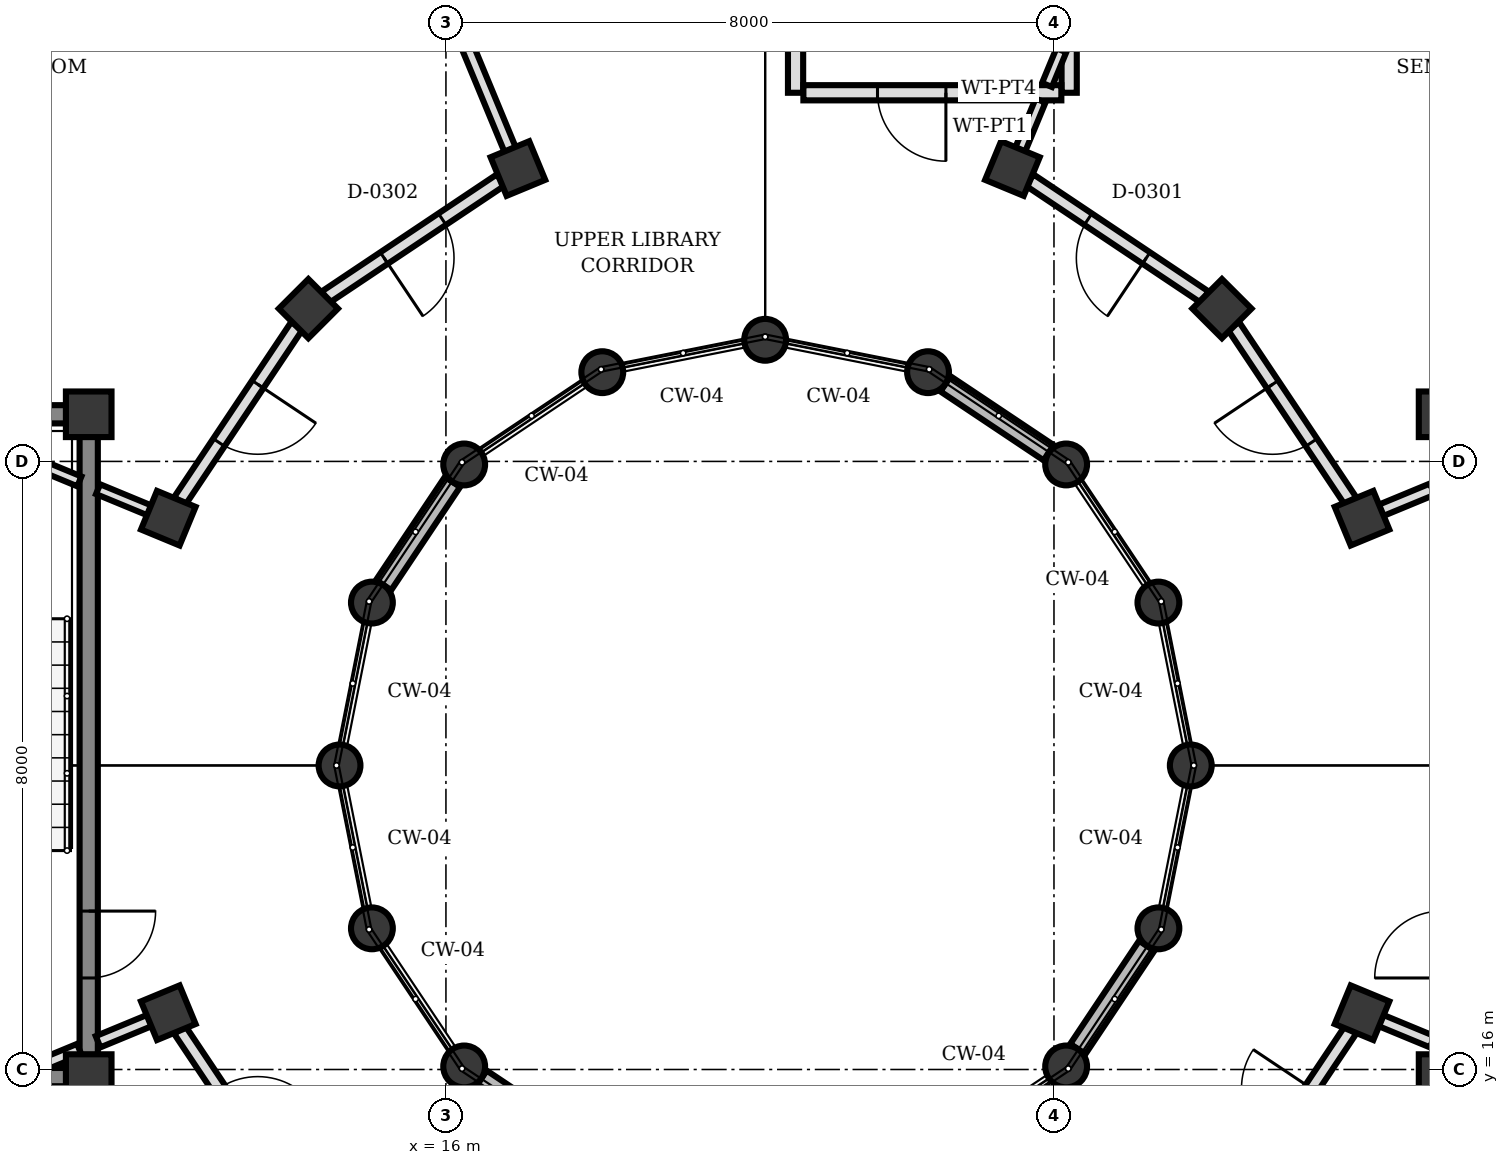
"""IFC4 building model, lengths in metres.
Left out: names, types, materials, properties, quantities, classifications, styles, units other than length and angle.
Written with IfcOpenShell. Run it as: python <this file> out.ifc"""

import sys

from ifc_helpers import new_model, si_unit, direction, frame, frame_2d, origin, origin_2d, place, context, subcontext, project, spatial, rectangle, circle, extrude, element, fill, save


model = new_model("IFC4")
c1 = context("Model", 3, precision=1e-05, world=origin(), true_north=direction((0.0, 1.0)))
c2 = subcontext(c1, "Body", "Model", "MODEL_VIEW")
j1 = project(units=[si_unit("LENGTHUNIT", "METRE"), si_unit("PLANEANGLEUNIT", "RADIAN")], contexts=[c1])
p1 = place(None, origin())
s1 = spatial("IfcSite", under=j1, at=p1, CompositionType="ELEMENT")
p2 = place(p1, origin())
s2 = spatial("IfcBuilding", under=s1, at=p2, CompositionType="ELEMENT")
p3 = place(p2, frame((0.0, 0.0, 8.5)))
s3 = spatial("IfcBuildingStorey", under=s2, at=p3, CompositionType="ELEMENT", Elevation=8.5)
for number, where, z_axis, x_axis in (
    (1, (11.3, 15.9, 0.0), (0.0, 0.0, 1.0), (1.0, 0.0, 0.0)),
    (2, (11.3, 24.62, 0.0), (0.0, 0.0, 1.0), (1.0, 0.0, 0.0)),
    (3, (29.1, 15.9, 0.0), (0.0, 0.0, 1.0), (1.0, 0.0, 0.0)),
    (4, (29.1, 24.62, 0.0), (0.0, 0.0, 1.0), (1.0, 0.0, 0.0)),
):
    element("IfcColumn", number, at=place(p3, frame(where, z_axis=z_axis, x_axis=x_axis)), inside=s3, PredefinedType="COLUMN", context=c2, shape_type="SweptSolid", body=[
        extrude(rectangle(XDim=0.6, YDim=0.6, at=origin_2d()), origin(), (0.0, 0.0, 1.0), 4.0),
    ])
for number, where, z_axis, x_axis in (
    (5, (25.8, 20.0, 0.0), (0.0, 0.0, 1.0), (1.0, 0.0, 0.0)),
    (6, (25.374, 22.143, 0.0), (0.0, 0.0, 1.0), (1.0, 0.0, 0.0)),
    (7, (24.16, 23.96, 0.0), (0.0, 0.0, 1.0), (1.0, 0.0, 0.0)),
    (8, (22.343, 25.174, 0.0), (0.0, 0.0, 1.0), (1.0, 0.0, 0.0)),
    (9, (20.2, 25.6, 0.0), (0.0, 0.0, 1.0), (1.0, 0.0, 0.0)),
    (10, (18.057, 25.174, 0.0), (0.0, 0.0, 1.0), (1.0, 0.0, 0.0)),
    (11, (16.24, 23.96, 0.0), (0.0, 0.0, 1.0), (1.0, 0.0, 0.0)),
    (12, (15.026, 22.143, 0.0), (0.0, 0.0, 1.0), (1.0, 0.0, 0.0)),
    (13, (14.6, 20.0, 0.0), (0.0, 0.0, 1.0), (1.0, 0.0, 0.0)),
    (14, (15.026, 17.857, 0.0), (0.0, 0.0, 1.0), (1.0, 0.0, 0.0)),
    (15, (16.24, 16.04, 0.0), (0.0, 0.0, 1.0), (1.0, 0.0, 0.0)),
    (16, (24.16, 16.04, 0.0), (0.0, 0.0, 1.0), (1.0, 0.0, 0.0)),
    (17, (25.374, 17.857, 0.0), (0.0, 0.0, 1.0), (1.0, 0.0, 0.0)),
):
    element("IfcColumn", number, at=place(p3, frame(where, z_axis=z_axis, x_axis=x_axis)), inside=s3, PredefinedType="COLUMN", context=c2, shape_type="SweptSolid", body=[
        extrude(circle(Radius=0.275, at=origin_2d()), origin(), (0.0, 0.0, 1.0), 4.0),
    ])
for number, where, z_axis, x_axis in (
    (18, (28.053, 23.253, 0.0), (0.0, 0.0, 1.0), (0.924, 0.383, 0.0)),
    (19, (26.21, 26.01, 0.0), (0.0, 0.0, 1.0), (0.707, 0.707, 0.0)),
    (20, (23.453, 27.853, 0.0), (0.0, 0.0, 1.0), (0.383, 0.924, 0.0)),
    (21, (16.947, 27.853, 0.0), (0.0, 0.0, 1.0), (-0.383, 0.924, 0.0)),
    (22, (14.19, 26.01, 0.0), (0.0, 0.0, 1.0), (-0.707, 0.707, 0.0)),
    (23, (12.347, 23.253, 0.0), (0.0, 0.0, 1.0), (-0.924, 0.383, 0.0)),
    (24, (12.347, 16.747, 0.0), (0.0, 0.0, 1.0), (-0.924, -0.383, 0.0)),
    (25, (28.053, 16.747, 0.0), (0.0, 0.0, 1.0), (0.924, -0.383, 0.0)),
):
    element("IfcColumn", number, at=place(p3, frame(where, z_axis=z_axis, x_axis=x_axis)), inside=s3, PredefinedType="COLUMN", context=c2, shape_type="SweptSolid", body=[
        extrude(rectangle(XDim=0.55, YDim=0.55, at=origin_2d()), origin(), (0.0, 0.0, 1.0), 4.0),
    ])
for number, where, z_axis, x_axis in (
    (26, (23.93, 24.114, 0.0), (0.0, 0.0, 1.0), (-0.832, 0.555, 0.0)),
    (27, (16.086, 23.73, 0.0), (0.0, 0.0, 1.0), (-0.555, -0.832, 0.0)),
    (28, (16.47, 15.886, 0.0), (0.0, 0.0, 1.0), (0.832, -0.555, 0.0)),
    (29, (24.314, 16.27, 0.0), (0.0, 0.0, 1.0), (0.555, 0.832, 0.0)),
):
    element("IfcWall", number, at=place(p3, frame(where, z_axis=z_axis, x_axis=x_axis)), inside=s3, PredefinedType="SOLIDWALL", context=c2, shape_type="SweptSolid", body=[
        extrude(rectangle(XDim=1.632, YDim=0.24, at=frame_2d((0.816, 0.0))), origin(), (0.0, 0.0, 1.0), 3.222),
    ])
p4 = place(p3, frame((11.3, 24.328, 0.0), z_axis=(0.0, 0.0, 1.0), x_axis=(0.0, -1.0, 0.0)))
e30 = element("IfcWall", 30, at=p4, inside=s3, PredefinedType="SHEAR", context=c2, shape_type="SweptSolid", body=[
    extrude(rectangle(XDim=8.136, YDim=0.24, at=frame_2d((4.068, 0.0))), origin(), (0.0, 0.0, 1.0), 3.74),
])
p5 = place(p4, frame((6.244, 0.0, 0.0)))
e31 = element("IfcOpeningElement", 31, at=p5, cuts=e30, PredefinedType="OPENING", context=c2, shape_type="SweptSolid", body=[
    extrude(rectangle(XDim=0.88, YDim=2.1, at=frame_2d((0.44, 1.05))), frame((0.0, 0.13, 0.0), z_axis=(0.0, -1.0, 0.0), x_axis=(1.0, 0.0, 0.0)), (0.0, 0.0, 1.0), 0.26),
])
for number, where, z_axis, x_axis in (
    (32, (11.008, 15.9, 0.0), (0.0, 0.0, 1.0), (-1.0, 0.0, 0.0)),
    (33, (11.008, 24.62, 0.0), (0.0, 0.0, 1.0), (-1.0, 0.0, 0.0)),
):
    element("IfcWall", number, at=place(p3, frame(where, z_axis=z_axis, x_axis=x_axis)), inside=s3, PredefinedType="SHEAR", context=c2, shape_type="SweptSolid", body=[
        extrude(rectangle(XDim=4.216, YDim=0.24, at=frame_2d((2.108, 0.0))), origin(), (0.0, 0.0, 1.0), 3.74),
    ])
p6 = place(p3, frame((20.6, 28.85, 0.0), z_axis=(0.0, 0.0, 1.0), x_axis=(0.0, 1.0, 0.0)))
e34 = element("IfcWall", 34, at=p6, inside=s3, PredefinedType="PARTITIONING", context=c2, shape_type="SweptSolid", body=[
    extrude(rectangle(XDim=3.283, YDim=0.2, at=frame_2d((1.642, 0.0))), origin(), (0.0, 0.0, 1.0), 3.7),
])
p7 = place(p3, frame((24.2, 28.85, 0.0), z_axis=(0.0, 0.0, 1.0), x_axis=(0.0, 1.0, 0.0)))
e35 = element("IfcWall", 35, at=p7, inside=s3, PredefinedType="PARTITIONING", context=c2, shape_type="SweptSolid", body=[
    extrude(rectangle(XDim=3.447, YDim=0.2, at=frame_2d((1.724, 0.0))), origin(), (0.0, 0.0, 1.0), 3.072),
])
p8 = place(p3, frame((24.097, 28.85, 0.0), z_axis=(0.0, 0.0, 1.0), x_axis=(-1.0, 0.0, 0.0)))
e36 = element("IfcWall", 36, at=p8, inside=s3, PredefinedType="PARTITIONING", context=c2, shape_type="SweptSolid", body=[
    extrude(rectangle(XDim=3.394, YDim=0.2, at=frame_2d((1.697, 0.0))), origin(), (0.0, 0.0, 1.0), 3.072),
])
p9 = place(p8, frame((1.519, 0.0, 0.0)))
e37 = element("IfcOpeningElement", 37, at=p9, cuts=e36, PredefinedType="OPENING", context=c2, shape_type="SweptSolid", body=[
    extrude(rectangle(XDim=0.9, YDim=2.2, at=frame_2d((0.45, 1.1))), frame((0.0, 0.11, 0.0), z_axis=(0.0, -1.0, 0.0), x_axis=(1.0, 0.0, 0.0)), (0.0, 0.0, 1.0), 0.22),
])
p10 = place(p3, frame((28.3, 23.355, 0.0), z_axis=(0.0, 0.0, 1.0), x_axis=(0.924069600435, 0.382224245113, 0.0)))
e38 = element("IfcWall", 38, at=p10, inside=s3, PredefinedType="PARTITIONING", context=c2, shape_type="SweptSolid", body=[
    extrude(rectangle(XDim=0.733, YDim=0.16, at=frame_2d((0.366, 0.0))), origin(), (0.0, 0.0, 1.0), 3.7),
])
p11 = place(p3, frame((23.555, 28.1, 0.0), z_axis=(0.0, 0.0, 1.0), x_axis=(0.38278283439, 0.923838352579, 0.0)))
e39 = element("IfcWall", 39, at=p11, inside=s3, PredefinedType="PARTITIONING", context=c2, shape_type="SweptSolid", body=[
    extrude(rectangle(XDim=0.7, YDim=0.14, at=frame_2d((0.35, 0.0))), origin(), (0.0, 0.0, 1.0), 3.072),
])
p12 = place(p3, frame((23.908, 28.953, 0.0), z_axis=(0.0, 0.0, 1.0), x_axis=(0.3827885685, 0.92383597669, 0.0)))
e40 = element("IfcWall", 40, at=p12, inside=s3, PredefinedType="PARTITIONING", context=c2, shape_type="SweptSolid", body=[
    extrude(rectangle(XDim=0.494, YDim=0.14, at=frame_2d((0.247, 0.0))), origin(), (0.0, 0.0, 1.0), 3.072),
])
p13 = place(p3, frame((16.845, 28.1, 0.0), z_axis=(0.0, 0.0, 1.0), x_axis=(-0.382683896966, 0.923879340067, 0.0)))
e41 = element("IfcWall", 41, at=p13, inside=s3, PredefinedType="PARTITIONING", context=c2, shape_type="SweptSolid", body=[
    extrude(rectangle(XDim=8.44, YDim=0.16, at=frame_2d((4.22, 0.0))), origin(), (0.0, 0.0, 1.0), 3.072),
])
p14 = place(p3, frame((12.1, 23.355, 0.0), z_axis=(0.0, 0.0, 1.0), x_axis=(-0.924069600435, 0.382224245113, 0.0)))
e42 = element("IfcWall", 42, at=p14, inside=s3, PredefinedType="PARTITIONING", context=c2, shape_type="SweptSolid", body=[
    extrude(rectangle(XDim=0.733, YDim=0.14, at=frame_2d((0.366, 0.0))), origin(), (0.0, 0.0, 1.0), 3.7),
])
p15 = place(p3, frame((11.177, 23.737, 0.0), z_axis=(0.0, 0.0, 1.0), x_axis=(-0.923817443679, 0.382833293686, 0.0)))
e43 = element("IfcWall", 43, at=p15, inside=s3, PredefinedType="PARTITIONING", context=c2, shape_type="SweptSolid", body=[
    extrude(rectangle(XDim=1.985, YDim=0.14, at=frame_2d((0.993, 0.0))), origin(), (0.0, 0.0, 1.0), 3.7),
])
p16 = place(p3, frame((12.1, 16.645, 0.0), z_axis=(0.0, 0.0, 1.0), x_axis=(-0.924069600435, -0.382224245113, 0.0)))
e44 = element("IfcWall", 44, at=p16, inside=s3, PredefinedType="PARTITIONING", context=c2, shape_type="SweptSolid", body=[
    extrude(rectangle(XDim=0.733, YDim=0.16, at=frame_2d((0.366, 0.0))), origin(), (0.0, 0.0, 1.0), 3.072),
])
p17 = place(p3, frame((11.177, 16.263, 0.0), z_axis=(0.0, 0.0, 1.0), x_axis=(-0.923812676193, -0.382844797933, 0.0)))
e45 = element("IfcWall", 45, at=p17, inside=s3, PredefinedType="PARTITIONING", context=c2, shape_type="SweptSolid", body=[
    extrude(rectangle(XDim=0.627, YDim=0.16, at=frame_2d((0.313, 0.0))), origin(), (0.0, 0.0, 1.0), 3.072),
])
p18 = place(p3, frame((28.3, 16.645, 0.0), z_axis=(0.0, 0.0, 1.0), x_axis=(0.924069600435, -0.382224245113, 0.0)))
e46 = element("IfcWall", 46, at=p18, inside=s3, PredefinedType="PARTITIONING", context=c2, shape_type="SweptSolid", body=[
    extrude(rectangle(XDim=0.733, YDim=0.16, at=frame_2d((0.366, 0.0))), origin(), (0.0, 0.0, 1.0), 3.072),
])
p19 = place(p3, frame((27.902, 23.479, 0.0), z_axis=(0.0, 0.0, 1.0), x_axis=(-0.555797002478, 0.831318045056, 0.0)))
e47 = element("IfcWall", 47, at=p19, inside=s3, PredefinedType="PARTITIONING", context=c2, shape_type="SweptSolid", body=[
    extrude(rectangle(XDim=2.773, YDim=0.18, at=frame_2d((1.386, 0.0))), origin(), (0.0, 0.0, 1.0), 3.072),
])
p20 = place(p19, frame((0.926, 0.0, 0.0)))
e48 = element("IfcOpeningElement", 48, at=p20, cuts=e47, PredefinedType="OPENING", context=c2, shape_type="SweptSolid", body=[
    extrude(rectangle(XDim=0.92, YDim=2.1, at=frame_2d((0.46, 1.05))), frame((0.0, 0.1, 0.0), z_axis=(0.0, -1.0, 0.0), x_axis=(1.0, 0.0, 0.0)), (0.0, 0.0, 1.0), 0.2),
])
p21 = place(p3, frame((25.984, 26.161, 0.0), z_axis=(0.0, 0.0, 1.0), x_axis=(-0.831318045056, 0.555797002478, 0.0)))
e49 = element("IfcWall", 49, at=p21, inside=s3, PredefinedType="PARTITIONING", context=c2, shape_type="SweptSolid", body=[
    extrude(rectangle(XDim=2.773, YDim=0.18, at=frame_2d((1.386, 0.0))), origin(), (0.0, 0.0, 1.0), 3.072),
])
p22 = place(p21, frame((0.926, 0.0, 0.0)))
e50 = element("IfcOpeningElement", 50, at=p22, cuts=e49, PredefinedType="OPENING", context=c2, shape_type="SweptSolid", body=[
    extrude(rectangle(XDim=0.92, YDim=2.1, at=frame_2d((0.46, 1.05))), frame((0.0, 0.1, 0.0), z_axis=(0.0, -1.0, 0.0), x_axis=(1.0, 0.0, 0.0)), (0.0, 0.0, 1.0), 0.2),
])
p23 = place(p3, frame((16.721, 27.702, 0.0), z_axis=(0.0, 0.0, 1.0), x_axis=(-0.831318045056, -0.555797002478, 0.0)))
e51 = element("IfcWall", 51, at=p23, inside=s3, PredefinedType="PARTITIONING", context=c2, shape_type="SweptSolid", body=[
    extrude(rectangle(XDim=2.773, YDim=0.18, at=frame_2d((1.386, 0.0))), origin(), (0.0, 0.0, 1.0), 3.072),
])
p24 = place(p23, frame((0.926, 0.0, 0.0)))
e52 = element("IfcOpeningElement", 52, at=p24, cuts=e51, PredefinedType="OPENING", context=c2, shape_type="SweptSolid", body=[
    extrude(rectangle(XDim=0.92, YDim=2.1, at=frame_2d((0.46, 1.05))), frame((0.0, 0.1, 0.0), z_axis=(0.0, -1.0, 0.0), x_axis=(1.0, 0.0, 0.0)), (0.0, 0.0, 1.0), 0.2),
])
p25 = place(p3, frame((14.039, 25.784, 0.0), z_axis=(0.0, 0.0, 1.0), x_axis=(-0.555797002478, -0.831318045056, 0.0)))
e53 = element("IfcWall", 53, at=p25, inside=s3, PredefinedType="PARTITIONING", context=c2, shape_type="SweptSolid", body=[
    extrude(rectangle(XDim=2.773, YDim=0.18, at=frame_2d((1.386, 0.0))), origin(), (0.0, 0.0, 1.0), 3.072),
])
p26 = place(p25, frame((0.926, 0.0, 0.0)))
e54 = element("IfcOpeningElement", 54, at=p26, cuts=e53, PredefinedType="OPENING", context=c2, shape_type="SweptSolid", body=[
    extrude(rectangle(XDim=0.92, YDim=2.1, at=frame_2d((0.46, 1.05))), frame((0.0, 0.1, 0.0), z_axis=(0.0, -1.0, 0.0), x_axis=(1.0, 0.0, 0.0)), (0.0, 0.0, 1.0), 0.2),
])
p27 = place(p3, frame((12.498, 16.521, 0.0), z_axis=(0.0, 0.0, 1.0), x_axis=(0.555797002478, -0.831318045056, 0.0)))
e55 = element("IfcWall", 55, at=p27, inside=s3, PredefinedType="PARTITIONING", context=c2, shape_type="SweptSolid", body=[
    extrude(rectangle(XDim=2.773, YDim=0.18, at=frame_2d((1.386, 0.0))), origin(), (0.0, 0.0, 1.0), 3.072),
])
p28 = place(p27, frame((0.926, 0.0, 0.0)))
e56 = element("IfcOpeningElement", 56, at=p28, cuts=e55, PredefinedType="OPENING", context=c2, shape_type="SweptSolid", body=[
    extrude(rectangle(XDim=0.92, YDim=2.1, at=frame_2d((0.46, 1.05))), frame((0.0, 0.1, 0.0), z_axis=(0.0, -1.0, 0.0), x_axis=(1.0, 0.0, 0.0)), (0.0, 0.0, 1.0), 0.2),
])
p29 = place(p3, frame((26.361, 14.216, 0.0), z_axis=(0.0, 0.0, 1.0), x_axis=(0.555797002478, 0.831318045056, 0.0)))
e57 = element("IfcWall", 57, at=p29, inside=s3, PredefinedType="PARTITIONING", context=c2, shape_type="SweptSolid", body=[
    extrude(rectangle(XDim=2.773, YDim=0.18, at=frame_2d((1.386, 0.0))), origin(), (0.0, 0.0, 1.0), 3.072),
])
p30 = place(p29, frame((0.926, 0.0, 0.0)))
e58 = element("IfcOpeningElement", 58, at=p30, cuts=e57, PredefinedType="OPENING", context=c2, shape_type="SweptSolid", body=[
    extrude(rectangle(XDim=0.92, YDim=2.1, at=frame_2d((0.46, 1.05))), frame((0.0, 0.1, 0.0), z_axis=(0.0, -1.0, 0.0), x_axis=(1.0, 0.0, 0.0)), (0.0, 0.0, 1.0), 0.2),
])
p31 = place(p5, origin())
e59 = element("IfcDoor", 59, at=p31, inside=s3, OperationType="SINGLE_SWING_LEFT", PredefinedType="DOOR", context=c2, shape_type="SweptSolid", body=[
    extrude(rectangle(XDim=0.88, YDim=2.1, at=frame_2d((0.44, 1.05))), frame((0.0, 0.025, 0.0), z_axis=(0.0, -1.0, 0.0), x_axis=(1.0, 0.0, 0.0)), (0.0, 0.0, 1.0), 0.05),
])
fill(e31, e59)
p32 = place(p9, origin())
e60 = element("IfcDoor", 60, at=p32, inside=s3, OperationType="SINGLE_SWING_LEFT", PredefinedType="DOOR", context=c2, shape_type="SweptSolid", body=[
    extrude(rectangle(XDim=0.9, YDim=2.2, at=frame_2d((0.45, 1.1))), frame((0.0, 0.025, 0.0), z_axis=(0.0, -1.0, 0.0), x_axis=(1.0, 0.0, 0.0)), (0.0, 0.0, 1.0), 0.05),
])
fill(e37, e60)
p33 = place(p20, origin())
e61 = element("IfcDoor", 61, at=p33, inside=s3, OperationType="SINGLE_SWING_RIGHT", PredefinedType="DOOR", context=c2, shape_type="SweptSolid", body=[
    extrude(rectangle(XDim=0.92, YDim=2.1, at=frame_2d((0.46, 1.05))), frame((0.0, 0.025, 0.0), z_axis=(0.0, -1.0, 0.0), x_axis=(1.0, 0.0, 0.0)), (0.0, 0.0, 1.0), 0.05),
])
fill(e48, e61)
p34 = place(p22, origin())
e62 = element("IfcDoor", 62, at=p34, inside=s3, OperationType="SINGLE_SWING_LEFT", PredefinedType="DOOR", context=c2, shape_type="SweptSolid", body=[
    extrude(rectangle(XDim=0.92, YDim=2.1, at=frame_2d((0.46, 1.05))), frame((0.0, 0.025, 0.0), z_axis=(0.0, -1.0, 0.0), x_axis=(1.0, 0.0, 0.0)), (0.0, 0.0, 1.0), 0.05),
])
fill(e50, e62)
p35 = place(p24, origin())
e63 = element("IfcDoor", 63, at=p35, inside=s3, OperationType="SINGLE_SWING_RIGHT", PredefinedType="DOOR", context=c2, shape_type="SweptSolid", body=[
    extrude(rectangle(XDim=0.92, YDim=2.1, at=frame_2d((0.46, 1.05))), frame((0.0, 0.025, 0.0), z_axis=(0.0, -1.0, 0.0), x_axis=(1.0, 0.0, 0.0)), (0.0, 0.0, 1.0), 0.05),
])
fill(e52, e63)
p36 = place(p26, origin())
e64 = element("IfcDoor", 64, at=p36, inside=s3, OperationType="SINGLE_SWING_LEFT", PredefinedType="DOOR", context=c2, shape_type="SweptSolid", body=[
    extrude(rectangle(XDim=0.92, YDim=2.1, at=frame_2d((0.46, 1.05))), frame((0.0, 0.025, 0.0), z_axis=(0.0, -1.0, 0.0), x_axis=(1.0, 0.0, 0.0)), (0.0, 0.0, 1.0), 0.05),
])
fill(e54, e64)
save(model, sys.argv[1])
